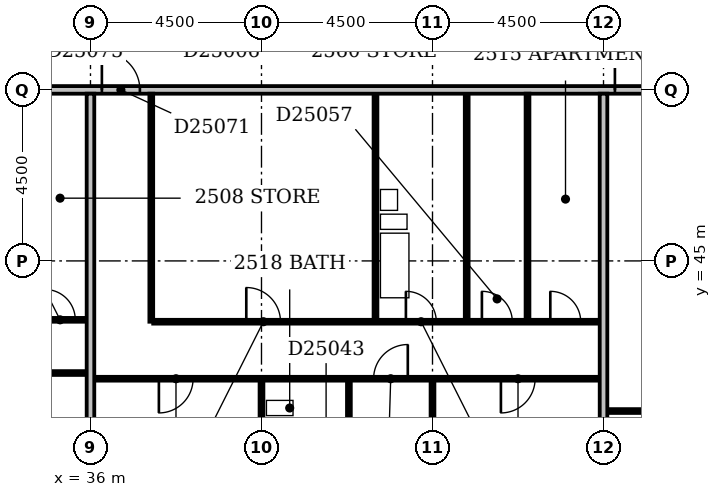
"""IFC4 building model, lengths in metres.
Left out: names, types, materials, properties, quantities, classifications, styles, units other than length and angle.
Written with IfcOpenShell. Run it as: python <this file> out.ifc"""

import sys

from ifc_helpers import new_model, si_unit, direction, frame, frame_2d, origin, place, context, subcontext, project, spatial, rectangle, extrude, element, fill, save


model = new_model("IFC4")
c1 = context("Model", 3, precision=1e-05, world=origin(), true_north=direction((0.0, 1.0)))
c2 = subcontext(c1, "Body", "Model", "MODEL_VIEW")
j1 = project(units=[si_unit("LENGTHUNIT", "METRE"), si_unit("PLANEANGLEUNIT", "RADIAN")], contexts=[c1])
p1 = place(None, origin())
s1 = spatial("IfcSite", under=j1, at=p1, CompositionType="ELEMENT")
p2 = place(p1, origin())
s2 = spatial("IfcBuilding", under=s1, at=p2, CompositionType="ELEMENT")
p3 = place(p2, frame((0.0, 0.0, 101.0)))
s3 = spatial("IfcBuildingStorey", under=s2, at=p3, CompositionType="ELEMENT", Elevation=101.0)
p4 = place(p3, frame((36.0, 36.6, 0.0), z_axis=(0.0, 0.0, 1.0), x_axis=(0.0, 1.0, 0.0)))
e1 = element("IfcWall", 1, at=p4, inside=s3, PredefinedType="PARTITIONING", context=c2, shape_type="SweptSolid", body=[
    extrude(rectangle(XDim=12.8, YDim=0.2, at=frame_2d((6.4, 0.0))), origin(), (0.0, 0.0, 1.0), 2.4),
])
p5 = place(p3, frame((40.5, 36.6, 0.0), z_axis=(0.0, 0.0, 1.0), x_axis=(0.0, 1.0, 0.0)))
e2 = element("IfcWall", 2, at=p5, inside=s3, PredefinedType="PARTITIONING", context=c2, shape_type="SweptSolid", body=[
    extrude(rectangle(XDim=5.25, YDim=0.1, at=frame_2d((2.625, 0.0))), origin(), (0.0, 0.0, 1.0), 3.3),
])
p6 = place(p3, frame((45.0, 36.6, 0.0), z_axis=(0.0, 0.0, 1.0), x_axis=(0.0, 1.0, 0.0)))
e3 = element("IfcWall", 3, at=p6, inside=s3, PredefinedType="PARTITIONING", context=c2, shape_type="SweptSolid", body=[
    extrude(rectangle(XDim=5.25, YDim=0.1, at=frame_2d((2.625, 0.0))), origin(), (0.0, 0.0, 1.0), 2.6),
])
p7 = place(p3, frame((49.5, 36.6, 0.0), z_axis=(0.0, 0.0, 1.0), x_axis=(0.0, 1.0, 0.0)))
e4 = element("IfcWall", 4, at=p7, inside=s3, PredefinedType="PARTITIONING", context=c2, shape_type="SweptSolid", body=[
    extrude(rectangle(XDim=12.8, YDim=0.2, at=frame_2d((6.4, 0.0))), origin(), (0.0, 0.0, 1.0), 3.3),
])
p8 = place(p3, frame((42.8, 39.0, 0.0), z_axis=(0.0, 0.0, 1.0), x_axis=(0.0, 1.0, 0.0)))
e5 = element("IfcWall", 5, at=p8, inside=s3, PredefinedType="PLUMBINGWALL", context=c2, shape_type="SweptSolid", body=[
    extrude(rectangle(XDim=2.85, YDim=0.1, at=frame_2d((1.425, 0.0))), origin(), (0.0, 0.0, 1.0), 3.3),
])
p9 = place(p8, frame((1.05, 0.0, 0.0)))
e6 = element("IfcOpeningElement", 6, at=p9, cuts=e5, PredefinedType="OPENING", context=c2, shape_type="SweptSolid", body=[
    extrude(rectangle(XDim=0.8, YDim=2.1, at=frame_2d((0.4, 1.05))), frame((0.0, 0.062, 0.0), z_axis=(0.0, -1.0, 0.0), x_axis=(1.0, 0.0, 0.0)), (0.0, 0.0, 1.0), 0.124),
])
p10 = place(p3, frame((49.6, 41.05, 0.0), z_axis=(0.0, 0.0, 1.0), x_axis=(1.0, 0.0, 0.0)))
e7 = element("IfcWall", 7, at=p10, inside=s3, PredefinedType="PARTITIONING", context=c2, shape_type="SweptSolid", body=[
    extrude(rectangle(XDim=17.3, YDim=0.1, at=frame_2d((8.65, 0.0))), origin(), (0.0, 0.0, 1.0), 3.3),
])
p11 = place(p10, frame((3.9, 0.0, 0.0)))
e8 = element("IfcOpeningElement", 8, at=p11, cuts=e7, PredefinedType="OPENING", context=c2, shape_type="SweptSolid", body=[
    extrude(rectangle(XDim=0.9, YDim=2.1, at=frame_2d((0.45, 1.05))), frame((0.0, 0.062, 0.0), z_axis=(0.0, -1.0, 0.0), x_axis=(1.0, 0.0, 0.0)), (0.0, 0.0, 1.0), 0.124),
])
p12 = place(p10, frame((10.7, 0.0, 0.0)))
e9 = element("IfcOpeningElement", 9, at=p12, cuts=e7, PredefinedType="OPENING", context=c2, shape_type="SweptSolid", body=[
    extrude(rectangle(XDim=0.9, YDim=2.1, at=frame_2d((0.45, 1.05))), frame((0.0, 0.062, 0.0), z_axis=(0.0, -1.0, 0.0), x_axis=(1.0, 0.0, 0.0)), (0.0, 0.0, 1.0), 0.124),
])
p13 = place(p10, frame((16.3, 0.0, 0.0)))
e10 = element("IfcOpeningElement", 10, at=p13, cuts=e7, PredefinedType="OPENING", context=c2, shape_type="SweptSolid", body=[
    extrude(rectangle(XDim=0.9, YDim=2.1, at=frame_2d((0.45, 1.05))), frame((0.0, 0.062, 0.0), z_axis=(0.0, -1.0, 0.0), x_axis=(1.0, 0.0, 0.0)), (0.0, 0.0, 1.0), 0.124),
])
p14 = place(p3, frame((36.1, 41.9, 0.0), z_axis=(0.0, 0.0, 1.0), x_axis=(1.0, 0.0, 0.0)))
e11 = element("IfcWall", 11, at=p14, inside=s3, PredefinedType="PARTITIONING", context=c2, shape_type="SweptSolid", body=[
    extrude(rectangle(XDim=13.3, YDim=0.1, at=frame_2d((6.65, 0.0))), origin(), (0.0, 0.0, 1.0), 3.3),
])
p15 = place(p14, frame((1.7, 0.0, 0.0)))
e12 = element("IfcOpeningElement", 12, at=p15, cuts=e11, PredefinedType="OPENING", context=c2, shape_type="SweptSolid", body=[
    extrude(rectangle(XDim=0.9, YDim=2.1, at=frame_2d((0.45, 1.05))), frame((0.0, 0.062, 0.0), z_axis=(0.0, -1.0, 0.0), x_axis=(1.0, 0.0, 0.0)), (0.0, 0.0, 1.0), 0.124),
])
p16 = place(p14, frame((7.35, 0.0, 0.0)))
e13 = element("IfcOpeningElement", 13, at=p16, cuts=e11, PredefinedType="OPENING", context=c2, shape_type="SweptSolid", body=[
    extrude(rectangle(XDim=0.9, YDim=2.1, at=frame_2d((0.45, 1.05))), frame((0.0, 0.062, 0.0), z_axis=(0.0, -1.0, 0.0), x_axis=(1.0, 0.0, 0.0)), (0.0, 0.0, 1.0), 0.124),
])
p17 = place(p14, frame((10.7, 0.0, 0.0)))
e14 = element("IfcOpeningElement", 14, at=p17, cuts=e11, PredefinedType="OPENING", context=c2, shape_type="SweptSolid", body=[
    extrude(rectangle(XDim=0.9, YDim=2.1, at=frame_2d((0.45, 1.05))), frame((0.0, 0.062, 0.0), z_axis=(0.0, -1.0, 0.0), x_axis=(1.0, 0.0, 0.0)), (0.0, 0.0, 1.0), 0.124),
])
p18 = place(p3, frame((27.1, 42.05, 0.0), z_axis=(0.0, 0.0, 1.0), x_axis=(1.0, 0.0, 0.0)))
e15 = element("IfcWall", 15, at=p18, inside=s3, PredefinedType="PARTITIONING", context=c2, shape_type="SweptSolid", body=[
    extrude(rectangle(XDim=8.8, YDim=0.1, at=frame_2d((4.4, 0.0))), origin(), (0.0, 0.0, 1.0), 3.3),
])
p19 = place(p18, frame((1.7, 0.0, 0.0)))
e16 = element("IfcOpeningElement", 16, at=p19, cuts=e15, PredefinedType="OPENING", context=c2, shape_type="SweptSolid", body=[
    extrude(rectangle(XDim=0.9, YDim=2.1, at=frame_2d((0.45, 1.05))), frame((0.0, 0.062, 0.0), z_axis=(0.0, -1.0, 0.0), x_axis=(1.0, 0.0, 0.0)), (0.0, 0.0, 1.0), 0.124),
])
p20 = place(p18, frame((6.2, 0.0, 0.0)))
e17 = element("IfcOpeningElement", 17, at=p20, cuts=e15, PredefinedType="OPENING", context=c2, shape_type="SweptSolid", body=[
    extrude(rectangle(XDim=0.9, YDim=2.1, at=frame_2d((0.45, 1.05))), frame((0.0, 0.062, 0.0), z_axis=(0.0, -1.0, 0.0), x_axis=(1.0, 0.0, 0.0)), (0.0, 0.0, 1.0), 0.124),
])
p21 = place(p3, frame((37.6, 43.4, 0.0), z_axis=(0.0, 0.0, 1.0), x_axis=(0.0, 1.0, 0.0)))
e18 = element("IfcWall", 18, at=p21, inside=s3, PredefinedType="PARTITIONING", context=c2, shape_type="SweptSolid", body=[
    extrude(rectangle(XDim=6.0, YDim=0.1, at=frame_2d((3.0, 0.0))), origin(), (0.0, 0.0, 1.0), 3.3),
])
p22 = place(p3, frame((37.65, 43.4, 0.0), z_axis=(0.0, 0.0, 1.0), x_axis=(1.0, 0.0, 0.0)))
e19 = element("IfcWall", 19, at=p22, inside=s3, PredefinedType="PARTITIONING", context=c2, shape_type="SweptSolid", body=[
    extrude(rectangle(XDim=11.75, YDim=0.1, at=frame_2d((5.875, 0.0))), origin(), (0.0, 0.0, 1.0), 3.3),
])
p23 = place(p22, frame((6.65, 0.0, 0.0)))
e20 = element("IfcOpeningElement", 20, at=p23, cuts=e19, PredefinedType="OPENING", context=c2, shape_type="SweptSolid", body=[
    extrude(rectangle(XDim=0.8, YDim=2.1, at=frame_2d((0.4, 1.05))), frame((0.0, 0.062, 0.0), z_axis=(0.0, -1.0, 0.0), x_axis=(1.0, 0.0, 0.0)), (0.0, 0.0, 1.0), 0.124),
])
p24 = place(p22, frame((2.45, 0.0, 0.0)))
e21 = element("IfcOpeningElement", 21, at=p24, cuts=e19, PredefinedType="OPENING", context=c2, shape_type="SweptSolid", body=[
    extrude(rectangle(XDim=0.9, YDim=2.1, at=frame_2d((0.45, 1.05))), frame((0.0, 0.062, 0.0), z_axis=(0.0, -1.0, 0.0), x_axis=(1.0, 0.0, 0.0)), (0.0, 0.0, 1.0), 0.124),
])
p25 = place(p22, frame((8.65, 0.0, 0.0)))
e22 = element("IfcOpeningElement", 22, at=p25, cuts=e19, PredefinedType="OPENING", context=c2, shape_type="SweptSolid", body=[
    extrude(rectangle(XDim=0.8, YDim=2.1, at=frame_2d((0.4, 1.05))), frame((0.0, 0.062, 0.0), z_axis=(0.0, -1.0, 0.0), x_axis=(1.0, 0.0, 0.0)), (0.0, 0.0, 1.0), 0.124),
])
p26 = place(p22, frame((10.45, 0.0, 0.0)))
e23 = element("IfcOpeningElement", 23, at=p26, cuts=e19, PredefinedType="OPENING", context=c2, shape_type="SweptSolid", body=[
    extrude(rectangle(XDim=0.8, YDim=2.1, at=frame_2d((0.4, 1.05))), frame((0.0, 0.062, 0.0), z_axis=(0.0, -1.0, 0.0), x_axis=(1.0, 0.0, 0.0)), (0.0, 0.0, 1.0), 0.124),
])
p27 = place(p3, frame((31.05, 43.45, 0.0), z_axis=(0.0, 0.0, 1.0), x_axis=(1.0, 0.0, 0.0)))
e24 = element("IfcWall", 24, at=p27, inside=s3, PredefinedType="PARTITIONING", context=c2, shape_type="SweptSolid", body=[
    extrude(rectangle(XDim=4.85, YDim=0.1, at=frame_2d((2.425, 0.0))), origin(), (0.0, 0.0, 1.0), 3.3),
])
p28 = place(p27, frame((1.2, 0.0, 0.0)))
e25 = element("IfcOpeningElement", 25, at=p28, cuts=e24, PredefinedType="OPENING", context=c2, shape_type="SweptSolid", body=[
    extrude(rectangle(XDim=0.9, YDim=2.1, at=frame_2d((0.45, 1.05))), frame((0.0, 0.062, 0.0), z_axis=(0.0, -1.0, 0.0), x_axis=(1.0, 0.0, 0.0)), (0.0, 0.0, 1.0), 0.124),
])
p29 = place(p27, frame((3.75, 0.0, 0.0)))
e26 = element("IfcOpeningElement", 26, at=p29, cuts=e24, PredefinedType="OPENING", context=c2, shape_type="SweptSolid", body=[
    extrude(rectangle(XDim=0.8, YDim=2.1, at=frame_2d((0.4, 1.05))), frame((0.0, 0.062, 0.0), z_axis=(0.0, -1.0, 0.0), x_axis=(1.0, 0.0, 0.0)), (0.0, 0.0, 1.0), 0.124),
])
for number, where, z_axis, x_axis in (
    (27, (43.5, 43.45, 0.0), (0.0, 0.0, 1.0), (0.0, 1.0, 0.0)),
    (28, (45.9, 43.45, 0.0), (0.0, 0.0, 1.0), (0.0, 1.0, 0.0)),
):
    element("IfcWall", number, at=place(p3, frame(where, z_axis=z_axis, x_axis=x_axis)), inside=s3, PredefinedType="PLUMBINGWALL", context=c2, shape_type="SweptSolid", body=[
        extrude(rectangle(XDim=5.95, YDim=0.1, at=frame_2d((2.975, 0.0))), origin(), (0.0, 0.0, 1.0), 3.3),
    ])
p30 = place(p3, frame((47.5, 43.45, 0.0), z_axis=(0.0, 0.0, 1.0), x_axis=(0.0, 1.0, 0.0)))
e29 = element("IfcWall", 29, at=p30, inside=s3, PredefinedType="PARTITIONING", context=c2, shape_type="SweptSolid", body=[
    extrude(rectangle(XDim=5.95, YDim=0.1, at=frame_2d((2.975, 0.0))), origin(), (0.0, 0.0, 1.0), 3.3),
])
p31 = place(p3, frame((9.1, 49.5, 0.0), z_axis=(0.0, 0.0, 1.0), x_axis=(1.0, 0.0, 0.0)))
e30 = element("IfcWall", 30, at=p31, inside=s3, PredefinedType="PARTITIONING", context=c2, shape_type="SweptSolid", body=[
    extrude(rectangle(XDim=57.8, YDim=0.2, at=frame_2d((28.9, 0.0))), origin(), (0.0, 0.0, 1.0), 3.3),
])
p32 = place(p31, frame((14.95, 0.0, 0.0)))
e31 = element("IfcOpeningElement", 31, at=p32, cuts=e30, PredefinedType="OPENING", context=c2, shape_type="SweptSolid", body=[
    extrude(rectangle(XDim=1.0, YDim=2.1, at=frame_2d((0.5, 1.05))), frame((0.0, 0.112, 0.0), z_axis=(0.0, -1.0, 0.0), x_axis=(1.0, 0.0, 0.0)), (0.0, 0.0, 1.0), 0.224),
])
p33 = place(p31, frame((20.6, 0.0, 0.0)))
e32 = element("IfcOpeningElement", 32, at=p33, cuts=e30, PredefinedType="OPENING", context=c2, shape_type="SweptSolid", body=[
    extrude(rectangle(XDim=1.0, YDim=2.1, at=frame_2d((0.5, 1.05))), frame((0.0, 0.112, 0.0), z_axis=(0.0, -1.0, 0.0), x_axis=(1.0, 0.0, 0.0)), (0.0, 0.0, 1.0), 0.224),
])
p34 = place(p31, frame((27.2, 0.0, 0.0)))
e33 = element("IfcOpeningElement", 33, at=p34, cuts=e30, PredefinedType="OPENING", context=c2, shape_type="SweptSolid", body=[
    extrude(rectangle(XDim=1.0, YDim=2.1, at=frame_2d((0.5, 1.05))), frame((0.0, 0.112, 0.0), z_axis=(0.0, -1.0, 0.0), x_axis=(1.0, 0.0, 0.0)), (0.0, 0.0, 1.0), 0.224),
])
p35 = place(p31, frame((40.7, 0.0, 0.0)))
e34 = element("IfcOpeningElement", 34, at=p35, cuts=e30, PredefinedType="OPENING", context=c2, shape_type="SweptSolid", body=[
    extrude(rectangle(XDim=1.0, YDim=2.1, at=frame_2d((0.5, 1.05))), frame((0.0, 0.112, 0.0), z_axis=(0.0, -1.0, 0.0), x_axis=(1.0, 0.0, 0.0)), (0.0, 0.0, 1.0), 0.224),
])
p36 = place(p31, frame((10.65, 0.0, 0.0)))
e35 = element("IfcOpeningElement", 35, at=p36, cuts=e30, PredefinedType="OPENING", context=c2, shape_type="SweptSolid", body=[
    extrude(rectangle(XDim=0.9, YDim=2.1, at=frame_2d((0.45, 1.05))), frame((0.0, 0.112, 0.0), z_axis=(0.0, -1.0, 0.0), x_axis=(1.0, 0.0, 0.0)), (0.0, 0.0, 1.0), 0.224),
])
p37 = place(p15, frame((0.9, 0.0, 0.0), z_axis=(0.0, 0.0, 1.0), x_axis=(-1.0, 0.0, 0.0)))
e36 = element("IfcDoor", 36, at=p37, inside=s3, OperationType="SINGLE_SWING_RIGHT", PredefinedType="DOOR", context=c2, shape_type="SweptSolid", body=[
    extrude(rectangle(XDim=0.9, YDim=2.1, at=frame_2d((0.45, 1.05))), frame((0.0, 0.025, 0.0), z_axis=(0.0, -1.0, 0.0), x_axis=(1.0, 0.0, 0.0)), (0.0, 0.0, 1.0), 0.05),
])
fill(e12, e36)
p38 = place(p16, frame((0.9, 0.0, 0.0), z_axis=(0.0, 0.0, 1.0), x_axis=(-1.0, 0.0, 0.0)))
e37 = element("IfcDoor", 37, at=p38, inside=s3, OperationType="SINGLE_SWING_LEFT", PredefinedType="DOOR", context=c2, shape_type="SweptSolid", body=[
    extrude(rectangle(XDim=0.9, YDim=2.1, at=frame_2d((0.45, 1.05))), frame((0.0, 0.025, 0.0), z_axis=(0.0, -1.0, 0.0), x_axis=(1.0, 0.0, 0.0)), (0.0, 0.0, 1.0), 0.05),
])
fill(e13, e37)
p39 = place(p17, frame((0.9, 0.0, 0.0), z_axis=(0.0, 0.0, 1.0), x_axis=(-1.0, 0.0, 0.0)))
e38 = element("IfcDoor", 38, at=p39, inside=s3, OperationType="SINGLE_SWING_RIGHT", PredefinedType="DOOR", context=c2, shape_type="SweptSolid", body=[
    extrude(rectangle(XDim=0.9, YDim=2.1, at=frame_2d((0.45, 1.05))), frame((0.0, 0.025, 0.0), z_axis=(0.0, -1.0, 0.0), x_axis=(1.0, 0.0, 0.0)), (0.0, 0.0, 1.0), 0.05),
])
fill(e14, e38)
p40 = place(p23, origin())
e39 = element("IfcDoor", 39, at=p40, inside=s3, OperationType="SINGLE_SWING_LEFT", PredefinedType="DOOR", context=c2, shape_type="SweptSolid", body=[
    extrude(rectangle(XDim=0.8, YDim=2.1, at=frame_2d((0.4, 1.05))), frame((0.0, 0.025, 0.0), z_axis=(0.0, -1.0, 0.0), x_axis=(1.0, 0.0, 0.0)), (0.0, 0.0, 1.0), 0.05),
])
fill(e20, e39)
p41 = place(p24, origin())
e40 = element("IfcDoor", 40, at=p41, inside=s3, OperationType="SINGLE_SWING_LEFT", PredefinedType="DOOR", context=c2, shape_type="SweptSolid", body=[
    extrude(rectangle(XDim=0.9, YDim=2.1, at=frame_2d((0.45, 1.05))), frame((0.0, 0.025, 0.0), z_axis=(0.0, -1.0, 0.0), x_axis=(1.0, 0.0, 0.0)), (0.0, 0.0, 1.0), 0.05),
])
fill(e21, e40)
p42 = place(p25, origin())
e41 = element("IfcDoor", 41, at=p42, inside=s3, OperationType="SINGLE_SWING_LEFT", PredefinedType="DOOR", context=c2, shape_type="SweptSolid", body=[
    extrude(rectangle(XDim=0.8, YDim=2.1, at=frame_2d((0.4, 1.05))), frame((0.0, 0.025, 0.0), z_axis=(0.0, -1.0, 0.0), x_axis=(1.0, 0.0, 0.0)), (0.0, 0.0, 1.0), 0.05),
])
fill(e22, e41)
p43 = place(p26, origin())
e42 = element("IfcDoor", 42, at=p43, inside=s3, OperationType="SINGLE_SWING_LEFT", PredefinedType="DOOR", context=c2, shape_type="SweptSolid", body=[
    extrude(rectangle(XDim=0.8, YDim=2.1, at=frame_2d((0.4, 1.05))), frame((0.0, 0.025, 0.0), z_axis=(0.0, -1.0, 0.0), x_axis=(1.0, 0.0, 0.0)), (0.0, 0.0, 1.0), 0.05),
])
fill(e23, e42)
p44 = place(p29, origin())
e43 = element("IfcDoor", 43, at=p44, inside=s3, OperationType="SINGLE_SWING_LEFT", PredefinedType="DOOR", context=c2, shape_type="SweptSolid", body=[
    extrude(rectangle(XDim=0.8, YDim=2.1, at=frame_2d((0.4, 1.05))), frame((0.0, 0.025, 0.0), z_axis=(0.0, -1.0, 0.0), x_axis=(1.0, 0.0, 0.0)), (0.0, 0.0, 1.0), 0.05),
])
fill(e26, e43)
p45 = place(p34, origin())
e44 = element("IfcDoor", 44, at=p45, inside=s3, OperationType="SINGLE_SWING_LEFT", PredefinedType="DOOR", context=c2, shape_type="SweptSolid", body=[
    extrude(rectangle(XDim=1.0, YDim=2.1, at=frame_2d((0.5, 1.05))), frame((0.0, 0.025, 0.0), z_axis=(0.0, -1.0, 0.0), x_axis=(1.0, 0.0, 0.0)), (0.0, 0.0, 1.0), 0.05),
])
fill(e33, e44)
p46 = place(p35, origin())
e45 = element("IfcDoor", 45, at=p46, inside=s3, OperationType="SINGLE_SWING_LEFT", PredefinedType="DOOR", context=c2, shape_type="SweptSolid", body=[
    extrude(rectangle(XDim=1.0, YDim=2.1, at=frame_2d((0.5, 1.05))), frame((0.0, 0.025, 0.0), z_axis=(0.0, -1.0, 0.0), x_axis=(1.0, 0.0, 0.0)), (0.0, 0.0, 1.0), 0.05),
])
fill(e34, e45)
save(model, sys.argv[1])
